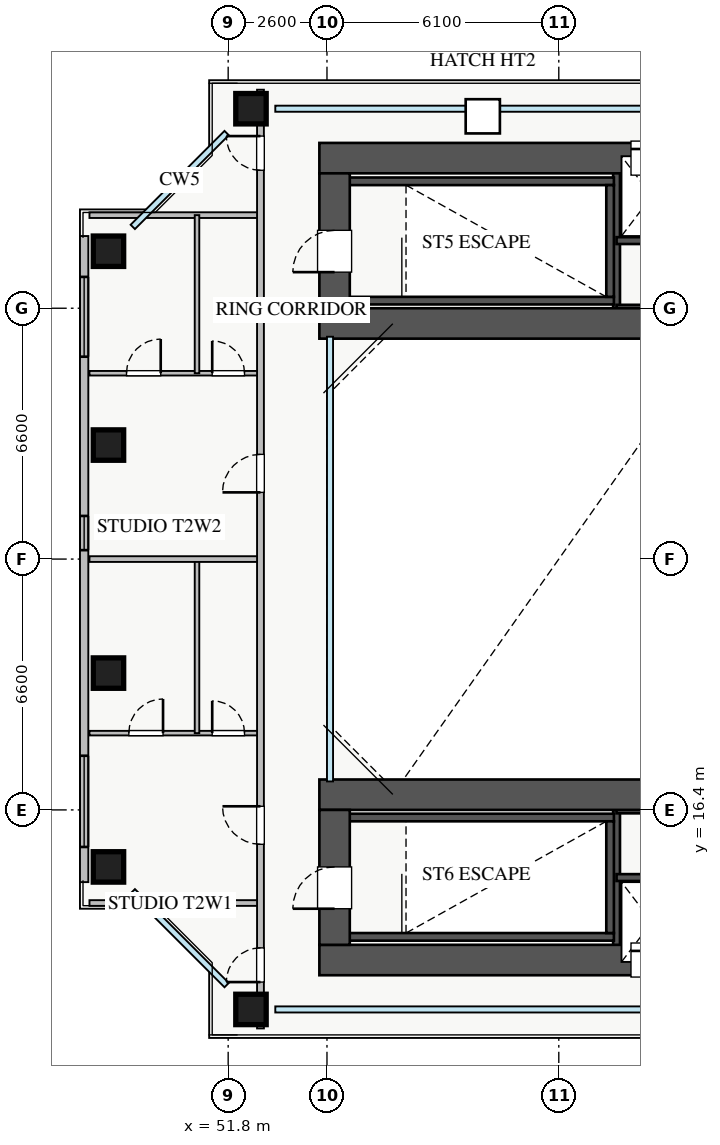
"""IFC4 building model, lengths in metres.
Left out: names, types, materials, properties, quantities, classifications, styles, units other than length and angle.
Written with IfcOpenShell. Run it as: python <this file> out.ifc"""

import sys

from ifc_helpers import new_model, si_unit, direction, frame, frame_2d, origin, origin_2d, place, context, subcontext, project, spatial, rectangle, extrude, source, transform, mapped, element, fill, save


model = new_model("IFC4")
c1 = context("Model", 3, precision=1e-05, world=origin(), true_north=direction((0.0, 1.0)))
c2 = subcontext(c1, "Body", "Model", "MODEL_VIEW")
j1 = project(units=[si_unit("LENGTHUNIT", "METRE"), si_unit("PLANEANGLEUNIT", "RADIAN")], contexts=[c1])
p1 = place(None, origin())
s1 = spatial("IfcSite", under=j1, at=p1, CompositionType="ELEMENT")
p2 = place(p1, origin())
s2 = spatial("IfcBuilding", under=s1, at=p2, CompositionType="ELEMENT")
p3 = place(p2, frame((0.0, 0.0, 110.0)))
s3 = spatial("IfcBuildingStorey", under=s2, at=p3, CompositionType="ELEMENT", Elevation=110.0)
p4 = place(p3, frame((62.02, 29.6, 0.0), z_axis=(0.0, 0.0, 1.0), x_axis=(0.0, 1.0, 0.0)))
e1 = element("IfcWall", 1, at=p4, inside=s3, PredefinedType="SHEAR", context=c2, shape_type="SweptSolid", body=[
    extrude(rectangle(XDim=3.95, YDim=0.18, at=frame_2d((1.975, 0.0))), origin(), (0.0, 0.0, 1.0), 3.07),
])
for number, where, z_axis, x_axis in (
    (2, (62.02, 31.38, 0.0), (0.0, 0.0, 1.0), (1.0, 0.0, 0.0)),
    (3, (62.02, 29.6, 0.0), (0.0, 0.0, 1.0), (1.0, 0.0, 0.0)),
):
    element("IfcWall", number, at=place(p3, frame(where, z_axis=z_axis, x_axis=x_axis)), inside=s3, PredefinedType="SHEAR", context=c2, shape_type="SweptSolid", body=[
        extrude(rectangle(XDim=1.86, YDim=0.18, at=frame_2d((0.93, 0.0))), origin(), (0.0, 0.0, 1.0), 3.07),
    ])
p5 = place(p3, frame((62.02, 12.45, 0.0), z_axis=(0.0, 0.0, 1.0), x_axis=(0.0, 1.0, 0.0)))
e4 = element("IfcWall", 4, at=p5, inside=s3, PredefinedType="SHEAR", context=c2, shape_type="SweptSolid", body=[
    extrude(rectangle(XDim=3.95, YDim=0.18, at=frame_2d((1.975, 0.0))), origin(), (0.0, 0.0, 1.0), 3.07),
])
for number, where, z_axis, x_axis in (
    (5, (62.02, 14.62, 0.0), (0.0, 0.0, 1.0), (1.0, 0.0, 0.0)),
    (6, (62.02, 16.4, 0.0), (0.0, 0.0, 1.0), (1.0, 0.0, 0.0)),
):
    element("IfcWall", number, at=place(p3, frame(where, z_axis=z_axis, x_axis=x_axis)), inside=s3, PredefinedType="SHEAR", context=c2, shape_type="SweptSolid", body=[
        extrude(rectangle(XDim=1.86, YDim=0.18, at=frame_2d((0.93, 0.0))), origin(), (0.0, 0.0, 1.0), 3.07),
    ])
for number, where, z_axis, x_axis in (
    (7, (54.8, 29.8, 0.0), (0.0, 0.0, 1.0), (1.0, 0.0, 0.0)),
    (8, (54.8, 32.94, 0.0), (0.0, 0.0, 1.0), (1.0, 0.0, 0.0)),
):
    element("IfcWall", number, at=place(p3, frame(where, z_axis=z_axis, x_axis=x_axis)), inside=s3, PredefinedType="SHEAR", context=c2, shape_type="SweptSolid", body=[
        extrude(rectangle(XDim=7.15, YDim=0.2, at=frame_2d((3.575, 0.0))), origin(), (0.0, 0.0, 1.0), 3.25),
    ])
p6 = place(p3, frame((61.85, 29.9, 0.0), z_axis=(0.0, 0.0, 1.0), x_axis=(0.0, 1.0, 0.0)))
e9 = element("IfcWall", 9, at=p6, inside=s3, PredefinedType="SHEAR", context=c2, shape_type="SweptSolid", body=[
    extrude(rectangle(XDim=2.94, YDim=0.2, at=frame_2d((1.47, 0.0))), origin(), (0.0, 0.0, 1.0), 3.25),
])
for number, where, z_axis, x_axis in (
    (10, (54.8, 13.06, 0.0), (0.0, 0.0, 1.0), (1.0, 0.0, 0.0)),
    (11, (54.8, 16.2, 0.0), (0.0, 0.0, 1.0), (1.0, 0.0, 0.0)),
):
    element("IfcWall", number, at=place(p3, frame(where, z_axis=z_axis, x_axis=x_axis)), inside=s3, PredefinedType="SHEAR", context=c2, shape_type="SweptSolid", body=[
        extrude(rectangle(XDim=7.15, YDim=0.2, at=frame_2d((3.575, 0.0))), origin(), (0.0, 0.0, 1.0), 3.25),
    ])
p7 = place(p3, frame((61.85, 13.16, 0.0), z_axis=(0.0, 0.0, 1.0), x_axis=(0.0, 1.0, 0.0)))
e12 = element("IfcWall", 12, at=p7, inside=s3, PredefinedType="SHEAR", context=c2, shape_type="SweptSolid", body=[
    extrude(rectangle(XDim=2.94, YDim=0.2, at=frame_2d((1.47, 0.0))), origin(), (0.0, 0.0, 1.0), 3.25),
])
p8 = place(p3, frame((54.2, 29.2, 0.0), z_axis=(0.0, 0.0, 1.0), x_axis=(1.0, 0.0, 0.0)))
e13 = element("IfcWall", 13, at=p8, inside=s3, PredefinedType="SHEAR", context=c2, shape_type="SweptSolid", body=[
    extrude(rectangle(XDim=12.6, YDim=0.8, at=frame_2d((6.3, 0.0))), origin(), (0.0, 0.0, 1.0), 3.25),
])
p9 = place(p3, frame((54.2, 33.55, 0.0), z_axis=(0.0, 0.0, 1.0), x_axis=(1.0, 0.0, 0.0)))
e14 = element("IfcWall", 14, at=p9, inside=s3, PredefinedType="SHEAR", context=c2, shape_type="SweptSolid", body=[
    extrude(rectangle(XDim=12.6, YDim=0.8, at=frame_2d((6.3, 0.0))), origin(), (0.0, 0.0, 1.0), 3.25),
])
p10 = place(p9, frame((8.2, 0.0, 0.0)))
e15 = element("IfcOpeningElement", 15, at=p10, cuts=e14, PredefinedType="OPENING", context=c2, shape_type="SweptSolid", body=[
    extrude(rectangle(XDim=1.1, YDim=2.05, at=frame_2d((0.55, 1.025))), frame((0.0, 0.41, 0.0), z_axis=(0.0, -1.0, 0.0), x_axis=(1.0, 0.0, 0.0)), (0.0, 0.0, 1.0), 0.82),
])
p11 = place(p3, frame((54.6, 29.6, 0.0), z_axis=(0.0, 0.0, 1.0), x_axis=(0.0, 1.0, 0.0)))
e16 = element("IfcWall", 16, at=p11, inside=s3, PredefinedType="SHEAR", context=c2, shape_type="SweptSolid", body=[
    extrude(rectangle(XDim=3.55, YDim=0.8, at=frame_2d((1.775, 0.0))), origin(), (0.0, 0.0, 1.0), 3.25),
])
p12 = place(p11, frame((0.95, 0.0, 0.0)))
e17 = element("IfcOpeningElement", 17, at=p12, cuts=e16, PredefinedType="OPENING", context=c2, shape_type="SweptSolid", body=[
    extrude(rectangle(XDim=1.1, YDim=2.05, at=frame_2d((0.55, 1.025))), frame((0.0, 0.41, 0.0), z_axis=(0.0, -1.0, 0.0), x_axis=(1.0, 0.0, 0.0)), (0.0, 0.0, 1.0), 0.82),
])
p13 = place(p3, frame((54.2, 12.45, 0.0), z_axis=(0.0, 0.0, 1.0), x_axis=(1.0, 0.0, 0.0)))
e18 = element("IfcWall", 18, at=p13, inside=s3, PredefinedType="SHEAR", context=c2, shape_type="SweptSolid", body=[
    extrude(rectangle(XDim=12.6, YDim=0.8, at=frame_2d((6.3, 0.0))), origin(), (0.0, 0.0, 1.0), 3.25),
])
p14 = place(p13, frame((8.2, 0.0, 0.0)))
e19 = element("IfcOpeningElement", 19, at=p14, cuts=e18, PredefinedType="OPENING", context=c2, shape_type="SweptSolid", body=[
    extrude(rectangle(XDim=1.1, YDim=2.05, at=frame_2d((0.55, 1.025))), frame((0.0, 0.41, 0.0), z_axis=(0.0, -1.0, 0.0), x_axis=(1.0, 0.0, 0.0)), (0.0, 0.0, 1.0), 0.82),
])
p15 = place(p3, frame((54.2, 16.8, 0.0), z_axis=(0.0, 0.0, 1.0), x_axis=(1.0, 0.0, 0.0)))
e20 = element("IfcWall", 20, at=p15, inside=s3, PredefinedType="SHEAR", context=c2, shape_type="SweptSolid", body=[
    extrude(rectangle(XDim=12.6, YDim=0.8, at=frame_2d((6.3, 0.0))), origin(), (0.0, 0.0, 1.0), 3.25),
])
p16 = place(p3, frame((54.6, 12.85, 0.0), z_axis=(0.0, 0.0, 1.0), x_axis=(0.0, 1.0, 0.0)))
e21 = element("IfcWall", 21, at=p16, inside=s3, PredefinedType="SHEAR", context=c2, shape_type="SweptSolid", body=[
    extrude(rectangle(XDim=3.55, YDim=0.8, at=frame_2d((1.775, 0.0))), origin(), (0.0, 0.0, 1.0), 3.25),
])
p17 = place(p16, frame((0.95, 0.0, 0.0)))
e22 = element("IfcOpeningElement", 22, at=p17, cuts=e21, PredefinedType="OPENING", context=c2, shape_type="SweptSolid", body=[
    extrude(rectangle(XDim=1.1, YDim=2.05, at=frame_2d((0.55, 1.025))), frame((0.0, 0.41, 0.0), z_axis=(0.0, -1.0, 0.0), x_axis=(1.0, 0.0, 0.0)), (0.0, 0.0, 1.0), 0.82),
])
m1 = source(origin(), c2, "Body", "SweptSolid", [
    extrude(rectangle(XDim=0.8, YDim=0.8, at=origin_2d()), origin(), (0.0, 0.0, 1.0), 3.25),
])
for number, where, z_axis, x_axis in (
    (23, (52.4, 11.15, 0.0), (0.0, 0.0, 1.0), (1.0, 0.0, 0.0)),
    (24, (52.4, 34.85, 0.0), (0.0, 0.0, 1.0), (1.0, 0.0, 0.0)),
    (25, (48.65, 14.9, 0.0), (0.0, 0.0, 1.0), (1.0, 0.0, 0.0)),
    (26, (48.65, 20.0, 0.0), (0.0, 0.0, 1.0), (1.0, 0.0, 0.0)),
    (27, (48.65, 26.0, 0.0), (0.0, 0.0, 1.0), (1.0, 0.0, 0.0)),
    (28, (48.65, 31.1, 0.0), (0.0, 0.0, 1.0), (1.0, 0.0, 0.0)),
):
    element("IfcColumn", number, at=place(p3, frame(where, z_axis=z_axis, x_axis=x_axis)), inside=s3, PredefinedType="COLUMN", context=c2, shape_type="MappedRepresentation", body=[
        mapped(m1, transform((0.0, 0.0, 0.0), x_axis=(1.0, 0.0, 0.0), y_axis=(0.0, 1.0, 0.0), z_axis=(0.0, 0.0, 1.0), scale=1.0)),
    ])
p18 = place(p3, frame((48.01, 14.5, 0.0), z_axis=(0.0, 0.0, 1.0), x_axis=(0.0, 1.0, 0.0)))
e29 = element("IfcWall", 29, at=p18, inside=s3, PredefinedType="STANDARD", context=c2, shape_type="SweptSolid", body=[
    extrude(rectangle(XDim=17.0, YDim=0.22, at=frame_2d((8.5, 0.0))), origin(), (0.0, 0.0, 1.0), 2.61),
])
p19 = place(p18, frame((0.925, 0.0, 0.9)))
e30 = element("IfcOpeningElement", 30, at=p19, cuts=e29, PredefinedType="OPENING", context=c2, shape_type="SweptSolid", body=[
    extrude(rectangle(XDim=2.4, YDim=1.48, at=frame_2d((1.2, 0.74))), frame((0.0, 0.12, 0.0), z_axis=(0.0, -1.0, 0.0), x_axis=(1.0, 0.0, 0.0)), (0.0, 0.0, 1.0), 0.24),
])
p20 = place(p18, frame((13.825, 0.0, 0.9)))
e31 = element("IfcOpeningElement", 31, at=p20, cuts=e29, PredefinedType="OPENING", context=c2, shape_type="SweptSolid", body=[
    extrude(rectangle(XDim=2.1, YDim=1.48, at=frame_2d((1.05, 0.74))), frame((0.0, 0.12, 0.0), z_axis=(0.0, -1.0, 0.0), x_axis=(1.0, 0.0, 0.0)), (0.0, 0.0, 1.0), 0.24),
])
p21 = place(p18, frame((8.735, 0.0, 0.9)))
e32 = element("IfcOpeningElement", 32, at=p21, cuts=e29, PredefinedType="OPENING", context=c2, shape_type="SweptSolid", body=[
    extrude(rectangle(XDim=0.9, YDim=1.2, at=frame_2d((0.45, 0.6))), frame((0.0, 0.12, 0.0), z_axis=(0.0, -1.0, 0.0), x_axis=(1.0, 0.0, 0.0)), (0.0, 0.0, 1.0), 0.24),
])
for number, where, z_axis, x_axis in (
    (33, (48.15, 32.05, 0.0), (0.0, 0.0, 1.0), (1.0, 0.0, 0.0)),
    (34, (48.15, 13.95, 0.0), (0.0, 0.0, 1.0), (1.0, 0.0, 0.0)),
):
    element("IfcWall", number, at=place(p3, frame(where, z_axis=z_axis, x_axis=x_axis)), inside=s3, PredefinedType="PARTITIONING", context=c2, shape_type="SweptSolid", body=[
        extrude(rectangle(XDim=4.5, YDim=0.15, at=frame_2d((2.25, 0.0))), origin(), (0.0, 0.0, 1.0), 3.07),
    ])
p22 = place(p3, frame((48.15, 18.42, 0.0), z_axis=(0.0, 0.0, 1.0), x_axis=(1.0, 0.0, 0.0)))
e35 = element("IfcWall", 35, at=p22, inside=s3, PredefinedType="PLUMBINGWALL", context=c2, shape_type="SweptSolid", body=[
    extrude(rectangle(XDim=4.5, YDim=0.12, at=frame_2d((2.25, 0.0))), origin(), (0.0, 0.0, 1.0), 2.821),
])
p23 = place(p22, frame((1.036, 0.0, 0.0)))
e36 = element("IfcOpeningElement", 36, at=p23, cuts=e35, PredefinedType="OPENING", context=c2, shape_type="SweptSolid", body=[
    extrude(rectangle(XDim=0.9, YDim=2.05, at=frame_2d((0.45, 1.025))), frame((0.0, 0.07, 0.0), z_axis=(0.0, -1.0, 0.0), x_axis=(1.0, 0.0, 0.0)), (0.0, 0.0, 1.0), 0.14),
])
p24 = place(p22, frame((3.23, 0.0, 0.0)))
e37 = element("IfcOpeningElement", 37, at=p24, cuts=e35, PredefinedType="OPENING", context=c2, shape_type="SweptSolid", body=[
    extrude(rectangle(XDim=0.85, YDim=2.05, at=frame_2d((0.425, 1.025))), frame((0.0, 0.07, 0.0), z_axis=(0.0, -1.0, 0.0), x_axis=(1.0, 0.0, 0.0)), (0.0, 0.0, 1.0), 0.14),
])
p25 = place(p3, frame((50.98, 18.42, 0.0), z_axis=(0.0, 0.0, 1.0), x_axis=(0.0, 1.0, 0.0)))
e38 = element("IfcWall", 38, at=p25, inside=s3, PredefinedType="PLUMBINGWALL", context=c2, shape_type="SweptSolid", body=[
    extrude(rectangle(XDim=4.58, YDim=0.12, at=frame_2d((2.29, 0.0))), origin(), (0.0, 0.0, 1.0), 3.07),
])
p26 = place(p3, frame((48.15, 27.89, 0.0), z_axis=(0.0, 0.0, 1.0), x_axis=(1.0, 0.0, 0.0)))
e39 = element("IfcWall", 39, at=p26, inside=s3, PredefinedType="PLUMBINGWALL", context=c2, shape_type="SweptSolid", body=[
    extrude(rectangle(XDim=4.5, YDim=0.12, at=frame_2d((2.25, 0.0))), origin(), (0.0, 0.0, 1.0), 3.07),
])
p27 = place(p26, frame((0.975, 0.0, 0.0)))
e40 = element("IfcOpeningElement", 40, at=p27, cuts=e39, PredefinedType="OPENING", context=c2, shape_type="SweptSolid", body=[
    extrude(rectangle(XDim=0.9, YDim=2.05, at=frame_2d((0.45, 1.025))), frame((0.0, 0.07, 0.0), z_axis=(0.0, -1.0, 0.0), x_axis=(1.0, 0.0, 0.0)), (0.0, 0.0, 1.0), 0.14),
])
p28 = place(p26, frame((3.23, 0.0, 0.0)))
e41 = element("IfcOpeningElement", 41, at=p28, cuts=e39, PredefinedType="OPENING", context=c2, shape_type="SweptSolid", body=[
    extrude(rectangle(XDim=0.85, YDim=2.05, at=frame_2d((0.425, 1.025))), frame((0.0, 0.07, 0.0), z_axis=(0.0, -1.0, 0.0), x_axis=(1.0, 0.0, 0.0)), (0.0, 0.0, 1.0), 0.14),
])
p29 = place(p3, frame((50.98, 27.89, 0.0), z_axis=(0.0, 0.0, 1.0), x_axis=(0.0, 1.0, 0.0)))
e42 = element("IfcWall", 42, at=p29, inside=s3, PredefinedType="PLUMBINGWALL", context=c2, shape_type="SweptSolid", body=[
    extrude(rectangle(XDim=4.16, YDim=0.12, at=frame_2d((2.08, 0.0))), origin(), (0.0, 0.0, 1.0), 3.07),
])
p30 = place(p3, frame((48.15, 23.0, 0.0), z_axis=(0.0, 0.0, 1.0), x_axis=(1.0, 0.0, 0.0)))
e43 = element("IfcWall", 43, at=p30, inside=s3, PredefinedType="PARTITIONING", context=c2, shape_type="SweptSolid", body=[
    extrude(rectangle(XDim=4.5, YDim=0.15, at=frame_2d((2.25, 0.0))), origin(), (0.0, 0.0, 1.0), 2.821),
])
p31 = place(p3, frame((52.65, 10.65, 0.0), z_axis=(0.0, 0.0, 1.0), x_axis=(0.0, 1.0, 0.0)))
e44 = element("IfcWall", 44, at=p31, inside=s3, PredefinedType="PARTITIONING", context=c2, shape_type="SweptSolid", body=[
    extrude(rectangle(XDim=24.7, YDim=0.18, at=frame_2d((12.35, 0.0))), origin(), (0.0, 0.0, 1.0), 2.615),
])
p32 = place(p31, frame((22.58, 0.0, 0.0)))
e45 = element("IfcOpeningElement", 45, at=p32, cuts=e44, PredefinedType="OPENING", context=c2, shape_type="SweptSolid", body=[
    extrude(rectangle(XDim=0.9, YDim=2.05, at=frame_2d((0.45, 1.025))), frame((0.0, 0.1, 0.0), z_axis=(0.0, -1.0, 0.0), x_axis=(1.0, 0.0, 0.0)), (0.0, 0.0, 1.0), 0.2),
])
p33 = place(p31, frame((1.22, 0.0, 0.0)))
e46 = element("IfcOpeningElement", 46, at=p33, cuts=e44, PredefinedType="OPENING", context=c2, shape_type="SweptSolid", body=[
    extrude(rectangle(XDim=0.9, YDim=2.05, at=frame_2d((0.45, 1.025))), frame((0.0, 0.1, 0.0), z_axis=(0.0, -1.0, 0.0), x_axis=(1.0, 0.0, 0.0)), (0.0, 0.0, 1.0), 0.2),
])
p34 = place(p31, frame((4.845, 0.0, 0.0)))
e47 = element("IfcOpeningElement", 47, at=p34, cuts=e44, PredefinedType="OPENING", context=c2, shape_type="SweptSolid", body=[
    extrude(rectangle(XDim=1.0, YDim=2.05, at=frame_2d((0.5, 1.025))), frame((0.0, 0.1, 0.0), z_axis=(0.0, -1.0, 0.0), x_axis=(1.0, 0.0, 0.0)), (0.0, 0.0, 1.0), 0.2),
])
p35 = place(p31, frame((14.105, 0.0, 0.0)))
e48 = element("IfcOpeningElement", 48, at=p35, cuts=e44, PredefinedType="OPENING", context=c2, shape_type="SweptSolid", body=[
    extrude(rectangle(XDim=1.0, YDim=2.05, at=frame_2d((0.5, 1.025))), frame((0.0, 0.1, 0.0), z_axis=(0.0, -1.0, 0.0), x_axis=(1.0, 0.0, 0.0)), (0.0, 0.0, 1.0), 0.2),
])
m2 = source(origin(), c2, "Body", "SweptSolid", [
    extrude(rectangle(XDim=2.4, YDim=1.48, at=frame_2d((1.2, 0.74))), frame((0.0, 0.03, 0.0), z_axis=(0.0, -1.0, 0.0), x_axis=(1.0, 0.0, 0.0)), (0.0, 0.0, 1.0), 0.06),
])
p36 = place(p19, origin())
e49 = element("IfcWindow", 49, at=p36, inside=s3, PartitioningType="TRIPLE_PANEL_VERTICAL", PredefinedType="WINDOW", context=c2, shape_type="MappedRepresentation", body=[
    mapped(m2, transform((0.0, 0.0, 0.0), x_axis=(1.0, 0.0, 0.0), y_axis=(0.0, 1.0, 0.0), z_axis=(0.0, 0.0, 1.0), scale=1.0)),
])
fill(e30, e49)
m3 = source(origin(), c2, "Body", "SweptSolid", [
    extrude(rectangle(XDim=2.1, YDim=1.48, at=frame_2d((1.05, 0.74))), frame((0.0, 0.03, 0.0), z_axis=(0.0, -1.0, 0.0), x_axis=(1.0, 0.0, 0.0)), (0.0, 0.0, 1.0), 0.06),
])
p37 = place(p20, origin())
e50 = element("IfcWindow", 50, at=p37, inside=s3, PartitioningType="TRIPLE_PANEL_VERTICAL", PredefinedType="WINDOW", context=c2, shape_type="MappedRepresentation", body=[
    mapped(m3, transform((0.0, 0.0, 0.0), x_axis=(1.0, 0.0, 0.0), y_axis=(0.0, 1.0, 0.0), z_axis=(0.0, 0.0, 1.0), scale=1.0)),
])
fill(e31, e50)
p38 = place(p3, frame((0.0, 0.0, -0.18)))
p39 = place(p38, frame((58.5, 34.65, 0.0)))
p40 = place(p39, frame((0.0, 0.0, 0.13)))
e51 = element("IfcDoor", 51, at=p40, inside=s3, OperationType="SINGLE_SWING_LEFT", PredefinedType="TRAPDOOR", context=c2, shape_type="SweptSolid", body=[
    extrude(rectangle(XDim=0.9, YDim=0.9, at=origin_2d()), origin(), (0.0, 0.0, 1.0), 0.05),
])
m4 = source(origin(), c2, "Body", "SweptSolid", [
    extrude(rectangle(XDim=1.1, YDim=2.05, at=frame_2d((0.55, 1.025))), frame((0.0, 0.025, 0.0), z_axis=(0.0, -1.0, 0.0), x_axis=(1.0, 0.0, 0.0)), (0.0, 0.0, 1.0), 0.05),
])
p41 = place(p12, origin())
e52 = element("IfcDoor", 52, at=p41, inside=s3, OperationType="SINGLE_SWING_LEFT", PredefinedType="DOOR", context=c2, shape_type="MappedRepresentation", body=[
    mapped(m4, transform((0.0, 0.0, 0.0), x_axis=(1.0, 0.0, 0.0), y_axis=(0.0, 1.0, 0.0), z_axis=(0.0, 0.0, 1.0), scale=1.0)),
])
fill(e17, e52)
p42 = place(p10, origin())
e53 = element("IfcDoor", 53, at=p42, inside=s3, OperationType="SLIDING_TO_LEFT", PredefinedType="DOOR", context=c2, shape_type="MappedRepresentation", body=[
    mapped(m4, transform((0.0, 0.0, 0.0), x_axis=(1.0, 0.0, 0.0), y_axis=(0.0, 1.0, 0.0), z_axis=(0.0, 0.0, 1.0), scale=1.0)),
])
fill(e15, e53)
p43 = place(p17, origin())
e54 = element("IfcDoor", 54, at=p43, inside=s3, OperationType="SINGLE_SWING_LEFT", PredefinedType="DOOR", context=c2, shape_type="MappedRepresentation", body=[
    mapped(m4, transform((0.0, 0.0, 0.0), x_axis=(1.0, 0.0, 0.0), y_axis=(0.0, 1.0, 0.0), z_axis=(0.0, 0.0, 1.0), scale=1.0)),
])
fill(e22, e54)
p44 = place(p14, origin())
e55 = element("IfcDoor", 55, at=p44, inside=s3, OperationType="SLIDING_TO_RIGHT", PredefinedType="DOOR", context=c2, shape_type="MappedRepresentation", body=[
    mapped(m4, transform((0.0, 0.0, 0.0), x_axis=(1.0, 0.0, 0.0), y_axis=(0.0, 1.0, 0.0), z_axis=(0.0, 0.0, 1.0), scale=1.0)),
])
fill(e19, e55)
m5 = source(origin(), c2, "Body", "SweptSolid", [
    extrude(rectangle(XDim=0.9, YDim=2.05, at=frame_2d((0.45, 1.025))), frame((0.0, 0.025, 0.0), z_axis=(0.0, -1.0, 0.0), x_axis=(1.0, 0.0, 0.0)), (0.0, 0.0, 1.0), 0.05),
])
p45 = place(p23, origin())
e56 = element("IfcDoor", 56, at=p45, inside=s3, OperationType="SINGLE_SWING_RIGHT", PredefinedType="DOOR", context=c2, shape_type="MappedRepresentation", body=[
    mapped(m5, transform((0.0, 0.0, 0.0), x_axis=(1.0, 0.0, 0.0), y_axis=(0.0, 1.0, 0.0), z_axis=(0.0, 0.0, 1.0), scale=1.0)),
])
fill(e36, e56)
m6 = source(origin(), c2, "Body", "SweptSolid", [
    extrude(rectangle(XDim=0.85, YDim=2.05, at=frame_2d((0.425, 1.025))), frame((0.0, 0.025, 0.0), z_axis=(0.0, -1.0, 0.0), x_axis=(1.0, 0.0, 0.0)), (0.0, 0.0, 1.0), 0.05),
])
p46 = place(p24, origin())
e57 = element("IfcDoor", 57, at=p46, inside=s3, OperationType="SINGLE_SWING_LEFT", PredefinedType="DOOR", context=c2, shape_type="MappedRepresentation", body=[
    mapped(m6, transform((0.0, 0.0, 0.0), x_axis=(1.0, 0.0, 0.0), y_axis=(0.0, 1.0, 0.0), z_axis=(0.0, 0.0, 1.0), scale=1.0)),
])
fill(e37, e57)
p47 = place(p27, origin())
e58 = element("IfcDoor", 58, at=p47, inside=s3, OperationType="SINGLE_SWING_RIGHT", PredefinedType="DOOR", context=c2, shape_type="MappedRepresentation", body=[
    mapped(m5, transform((0.0, 0.0, 0.0), x_axis=(1.0, 0.0, 0.0), y_axis=(0.0, 1.0, 0.0), z_axis=(0.0, 0.0, 1.0), scale=1.0)),
])
fill(e40, e58)
p48 = place(p28, origin())
e59 = element("IfcDoor", 59, at=p48, inside=s3, OperationType="SINGLE_SWING_LEFT", PredefinedType="DOOR", context=c2, shape_type="MappedRepresentation", body=[
    mapped(m6, transform((0.0, 0.0, 0.0), x_axis=(1.0, 0.0, 0.0), y_axis=(0.0, 1.0, 0.0), z_axis=(0.0, 0.0, 1.0), scale=1.0)),
])
fill(e41, e59)
p49 = place(p32, origin())
e60 = element("IfcDoor", 60, at=p49, inside=s3, OperationType="SINGLE_SWING_RIGHT", PredefinedType="DOOR", context=c2, shape_type="MappedRepresentation", body=[
    mapped(m5, transform((0.0, 0.0, 0.0), x_axis=(1.0, 0.0, 0.0), y_axis=(0.0, 1.0, 0.0), z_axis=(0.0, 0.0, 1.0), scale=1.0)),
])
fill(e45, e60)
p50 = place(p33, origin())
e61 = element("IfcDoor", 61, at=p50, inside=s3, OperationType="SINGLE_SWING_LEFT", PredefinedType="DOOR", context=c2, shape_type="MappedRepresentation", body=[
    mapped(m5, transform((0.0, 0.0, 0.0), x_axis=(1.0, 0.0, 0.0), y_axis=(0.0, 1.0, 0.0), z_axis=(0.0, 0.0, 1.0), scale=1.0)),
])
fill(e46, e61)
m7 = source(origin(), c2, "Body", "SweptSolid", [
    extrude(rectangle(XDim=1.0, YDim=2.05, at=frame_2d((0.5, 1.025))), frame((0.0, 0.025, 0.0), z_axis=(0.0, -1.0, 0.0), x_axis=(1.0, 0.0, 0.0)), (0.0, 0.0, 1.0), 0.05),
])
p51 = place(p34, origin())
e62 = element("IfcDoor", 62, at=p51, inside=s3, OperationType="SINGLE_SWING_RIGHT", PredefinedType="DOOR", context=c2, shape_type="MappedRepresentation", body=[
    mapped(m7, transform((0.0, 0.0, 0.0), x_axis=(1.0, 0.0, 0.0), y_axis=(0.0, 1.0, 0.0), z_axis=(0.0, 0.0, 1.0), scale=1.0)),
])
fill(e47, e62)
p52 = place(p35, origin())
e63 = element("IfcDoor", 63, at=p52, inside=s3, OperationType="SINGLE_SWING_LEFT", PredefinedType="DOOR", context=c2, shape_type="MappedRepresentation", body=[
    mapped(m7, transform((0.0, 0.0, 0.0), x_axis=(1.0, 0.0, 0.0), y_axis=(0.0, 1.0, 0.0), z_axis=(0.0, 0.0, 1.0), scale=1.0)),
])
fill(e48, e63)
m8 = source(origin(), c2, "Body", "SweptSolid", [
    extrude(rectangle(XDim=0.9, YDim=1.2, at=frame_2d((0.45, 0.6))), frame((0.0, 0.03, 0.0), z_axis=(0.0, -1.0, 0.0), x_axis=(1.0, 0.0, 0.0)), (0.0, 0.0, 1.0), 0.06),
])
p53 = place(p21, origin())
e64 = element("IfcWindow", 64, at=p53, inside=s3, PartitioningType="SINGLE_PANEL", PredefinedType="WINDOW", context=c2, shape_type="MappedRepresentation", body=[
    mapped(m8, transform((0.0, 0.0, 0.0), x_axis=(1.0, 0.0, 0.0), y_axis=(0.0, 1.0, 0.0), z_axis=(0.0, 0.0, 1.0), scale=1.0)),
])
fill(e32, e64)
save(model, sys.argv[1])
